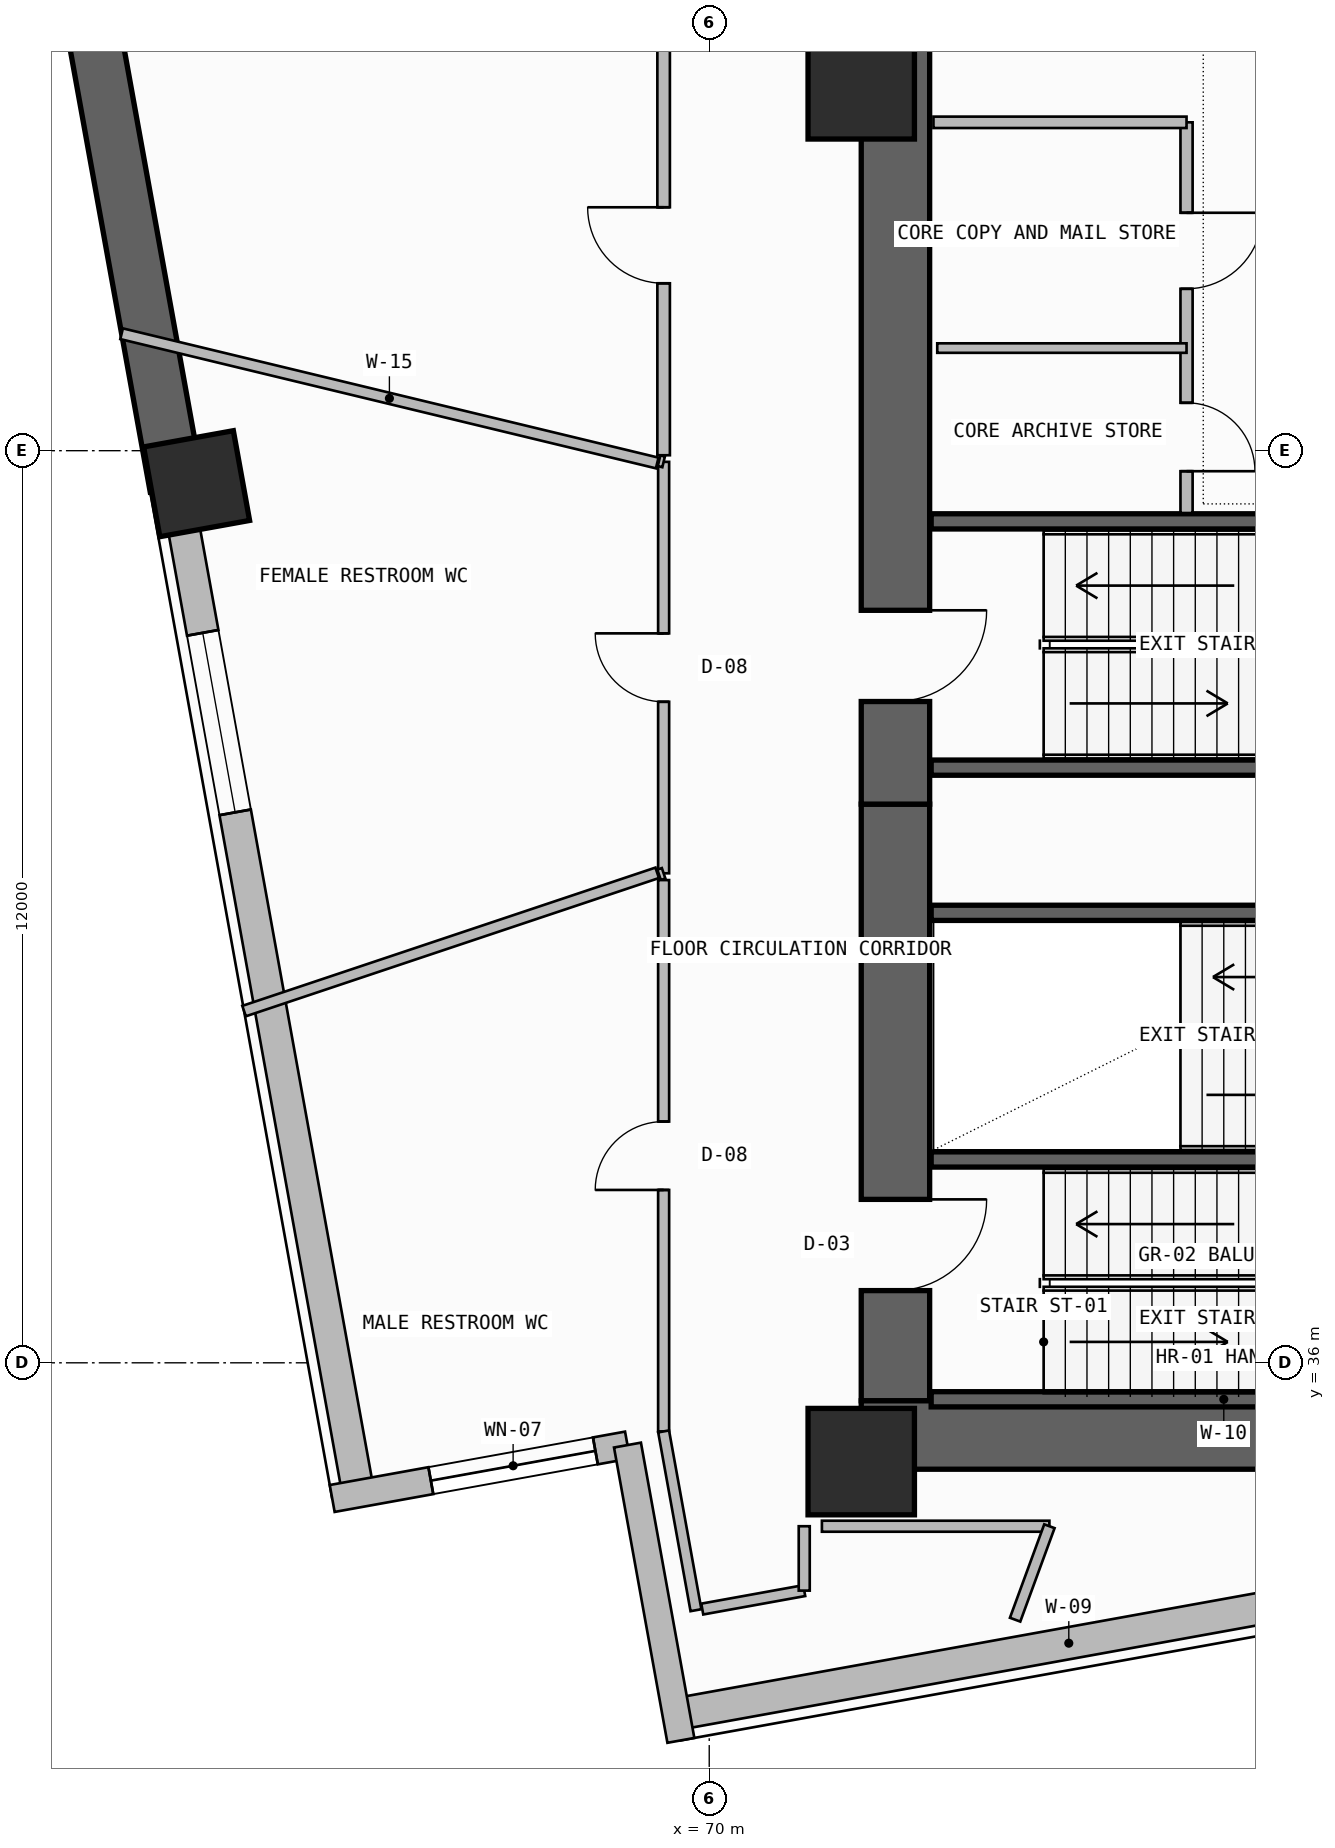
"""IFC4 building model, lengths in metres.
Left out: names, types, materials, properties, quantities, classifications, styles, units other than length and angle.
Written with IfcOpenShell. Run it as: python <this file> out.ifc"""

import sys

from ifc_helpers import new_model, si_unit, direction, frame, frame_2d, origin, origin_2d, place, context, subcontext, project, spatial, rectangle, extrude, element, fill, save


model = new_model("IFC4")
c1 = context("Model", 3, precision=1e-05, world=origin(), true_north=direction((0.0, 1.0)))
c2 = subcontext(c1, "Body", "Model", "MODEL_VIEW")
j1 = project(units=[si_unit("LENGTHUNIT", "METRE"), si_unit("PLANEANGLEUNIT", "RADIAN")], contexts=[c1])
p1 = place(None, origin())
s1 = spatial("IfcSite", under=j1, at=p1, CompositionType="ELEMENT")
p2 = place(p1, origin())
s2 = spatial("IfcBuilding", under=s1, at=p2, CompositionType="ELEMENT")
p3 = place(p2, frame((0.0, 0.0, 99.3)))
s3 = spatial("IfcBuildingStorey", under=s2, at=p3, CompositionType="ELEMENT", Elevation=99.3)
p4 = place(p3, frame((72.45, 35.5, -0.26), z_axis=(0.0, 0.0, 1.0), x_axis=(0.0, 1.0, 0.0)))
e1 = element("IfcWall", 1, at=p4, inside=s3, PredefinedType="SHEAR", context=c2, shape_type="SweptSolid", body=[
    extrude(rectangle(XDim=7.85, YDim=0.9, at=frame_2d((3.925, 0.0))), origin(), (0.0, 0.0, 1.0), 3.6),
])
p5 = place(p4, frame((1.45, 0.0, 0.26)))
e2 = element("IfcOpeningElement", 2, at=p5, cuts=e1, PredefinedType="OPENING", context=c2, shape_type="SweptSolid", body=[
    extrude(rectangle(XDim=1.2, YDim=2.2, at=frame_2d((0.6, 1.1))), frame((0.0, 0.46, 0.0), z_axis=(0.0, -1.0, 0.0), x_axis=(1.0, 0.0, 0.0)), (0.0, 0.0, 1.0), 0.92),
])
p6 = place(p3, frame((72.0, 35.05, -0.26), z_axis=(0.0, 0.0, 1.0), x_axis=(1.0, 0.0, 0.0)))
e3 = element("IfcWall", 3, at=p6, inside=s3, PredefinedType="SHEAR", context=c2, shape_type="SweptSolid", body=[
    extrude(rectangle(XDim=13.9, YDim=0.9, at=frame_2d((6.95, 0.0))), origin(), (0.0, 0.0, 1.0), 3.6),
])
p7 = place(p3, frame((72.45, 43.35, -0.26), z_axis=(0.0, 0.0, 1.0), x_axis=(0.0, 1.0, 0.0)))
e4 = element("IfcWall", 4, at=p7, inside=s3, PredefinedType="SHEAR", context=c2, shape_type="SweptSolid", body=[
    extrude(rectangle(XDim=12.7, YDim=0.9, at=frame_2d((6.35, 0.0))), origin(), (0.0, 0.0, 1.0), 3.6),
])
p8 = place(p7, frame((1.35, 0.0, 0.26)))
e5 = element("IfcOpeningElement", 5, at=p8, cuts=e4, PredefinedType="OPENING", context=c2, shape_type="SweptSolid", body=[
    extrude(rectangle(XDim=1.2, YDim=2.2, at=frame_2d((0.6, 1.1))), frame((0.0, 0.46, 0.0), z_axis=(0.0, -1.0, 0.0), x_axis=(1.0, 0.0, 0.0)), (0.0, 0.0, 1.0), 0.92),
])
for number, where, z_axis, x_axis in (
    (6, (72.0, 34.7, 0.0), (0.0, 0.0, 1.0), (1.0, 0.0, 0.0)),
    (7, (72.0, 52.8, 0.0), (0.0, 0.0, 1.0), (1.0, 0.0, 0.0)),
):
    element("IfcColumn", number, at=place(p3, frame(where, z_axis=z_axis, x_axis=x_axis)), inside=s3, PredefinedType="COLUMN", context=c2, shape_type="SweptSolid", body=[
        extrude(rectangle(XDim=1.4, YDim=1.4, at=origin_2d()), origin(), (0.0, 0.0, 1.0), 3.6),
    ])
p9 = place(p3, frame((63.255, 47.566, 0.0), z_axis=(0.0, 0.0, 1.0), x_axis=(-0.177943545474, 0.984040697646, 0.0)))
e8 = element("IfcColumn", 8, at=p9, inside=s3, PredefinedType="COLUMN", context=c2, shape_type="SweptSolid", body=[
    extrude(rectangle(XDim=1.2, YDim=1.2, at=origin_2d()), origin(), (0.0, 0.0, 1.0), 3.6),
])
p10 = place(p3, frame((69.565, 31.377, 0.0), z_axis=(0.0, 0.0, 1.0), x_axis=(0.98404091451, 0.177942346197, 0.0)))
e9 = element("IfcWall", 9, at=p10, inside=s3, PredefinedType="SOLIDWALL", context=c2, shape_type="SweptSolid", body=[
    extrude(rectangle(XDim=15.583, YDim=0.42, at=frame_2d((7.792, 0.0))), origin(), (0.0, 0.0, 1.0), 3.34),
])
p11 = place(p10, frame((10.5, 0.0, 1.2)))
e10 = element("IfcOpeningElement", 10, at=p11, cuts=e9, PredefinedType="OPENING", context=c2, shape_type="SweptSolid", body=[
    extrude(rectangle(XDim=2.4, YDim=0.9, at=frame_2d((1.2, 0.45))), frame((0.0, 0.22, 0.0), z_axis=(0.0, -1.0, 0.0), x_axis=(1.0, 0.0, 0.0)), (0.0, 0.0, 1.0), 0.44),
])
p12 = place(p3, frame((59.328, 67.768, -0.26), z_axis=(0.0, 0.0, 1.0), x_axis=(0.177933213615, -0.984042565895, 0.0)))
e11 = element("IfcWall", 11, at=p12, inside=s3, PredefinedType="SHEAR", context=c2, shape_type="SweptSolid", body=[
    extrude(rectangle(XDim=20.579, YDim=0.7, at=frame_2d((10.289, 0.0))), origin(), (0.0, 0.0, 1.0), 3.6),
])
p13 = place(p12, frame((9.1, 0.0, 1.2)))
e12 = element("IfcOpeningElement", 12, at=p13, cuts=e11, PredefinedType="OPENING", context=c2, shape_type="SweptSolid", body=[
    extrude(rectangle(XDim=2.4, YDim=0.9, at=frame_2d((1.2, 0.45))), frame((0.0, 0.36, 0.0), z_axis=(0.0, -1.0, 0.0), x_axis=(1.0, 0.0, 0.0)), (0.0, 0.0, 1.0), 0.72),
])
p14 = place(p3, frame((62.99, 47.518, 0.0), z_axis=(0.0, 0.0, 1.0), x_axis=(0.177948058674, -0.984039881516, 0.0)))
e13 = element("IfcWall", 13, at=p14, inside=s3, PredefinedType="SOLIDWALL", context=c2, shape_type="SweptSolid", body=[
    extrude(rectangle(XDim=13.455, YDim=0.42, at=frame_2d((6.728, 0.0))), origin(), (0.0, 0.0, 1.0), 2.725),
])
p15 = place(p14, frame((1.945, 0.0, 1.2)))
e14 = element("IfcOpeningElement", 14, at=p15, cuts=e13, PredefinedType="OPENING", context=c2, shape_type="SweptSolid", body=[
    extrude(rectangle(XDim=2.4, YDim=0.9, at=frame_2d((1.2, 0.45))), frame((0.0, 0.22, 0.0), z_axis=(0.0, -1.0, 0.0), x_axis=(1.0, 0.0, 0.0)), (0.0, 0.0, 1.0), 0.44),
])
p16 = place(p3, frame((65.039, 34.215, 0.0), z_axis=(0.0, 0.0, 1.0), x_axis=(0.984046535247, 0.177911260096, 0.0)))
e15 = element("IfcWall", 15, at=p16, inside=s3, PredefinedType="SOLIDWALL", context=c2, shape_type="SweptSolid", body=[
    extrude(rectangle(XDim=3.948, YDim=0.36, at=frame_2d((1.974, 0.0))), origin(), (0.0, 0.0, 1.0), 3.34),
])
p17 = place(p16, frame((1.319, 0.0, 0.45)))
e16 = element("IfcOpeningElement", 16, at=p17, cuts=e15, PredefinedType="OPENING", context=c2, shape_type="SweptSolid", body=[
    extrude(rectangle(XDim=2.2, YDim=2.4, at=frame_2d((1.1, 1.2))), frame((0.0, 0.19, 0.0), z_axis=(0.0, -1.0, 0.0), x_axis=(1.0, 0.0, 0.0)), (0.0, 0.0, 1.0), 0.38),
])
p18 = place(p3, frame((68.924, 34.917, 0.0), z_axis=(0.0, 0.0, 1.0), x_axis=(0.177981971326, -0.984033748346, 0.0)))
e17 = element("IfcWall", 17, at=p18, inside=s3, PredefinedType="SOLIDWALL", context=c2, shape_type="SweptSolid", body=[
    extrude(rectangle(XDim=3.948, YDim=0.36, at=frame_2d((1.974, 0.0))), origin(), (0.0, 0.0, 1.0), 3.34),
])
for number, where, z_axis, x_axis in (
    (18, (72.92, 35.52, -0.26), (0.0, 0.0, 1.0), (1.0, 0.0, 0.0)),
    (19, (72.92, 38.675, -0.26), (0.0, 0.0, 1.0), (1.0, 0.0, 0.0)),
):
    element("IfcWall", number, at=place(p3, frame(where, z_axis=z_axis, x_axis=x_axis)), inside=s3, PredefinedType="SOLIDWALL", context=c2, shape_type="SweptSolid", body=[
        extrude(rectangle(XDim=7.7, YDim=0.2, at=frame_2d((3.85, 0.0))), origin(), (0.0, 0.0, 1.0), 3.6),
    ])
p19 = place(p3, frame((72.92, 41.92, -0.26), z_axis=(0.0, 0.0, 1.0), x_axis=(1.0, 0.0, 0.0)))
e20 = element("IfcWall", 20, at=p19, inside=s3, PredefinedType="SOLIDWALL", context=c2, shape_type="SweptSolid", body=[
    extrude(rectangle(XDim=7.58, YDim=0.2, at=frame_2d((3.79, 0.0))), origin(), (0.0, 0.0, 1.0), 3.6),
])
for number, where, z_axis, x_axis in (
    (21, (72.92, 43.83, -0.26), (0.0, 0.0, 1.0), (1.0, 0.0, 0.0)),
    (22, (72.92, 47.07, -0.26), (0.0, 0.0, 1.0), (1.0, 0.0, 0.0)),
):
    element("IfcWall", number, at=place(p3, frame(where, z_axis=z_axis, x_axis=x_axis)), inside=s3, PredefinedType="SOLIDWALL", context=c2, shape_type="SweptSolid", body=[
        extrude(rectangle(XDim=7.7, YDim=0.2, at=frame_2d((3.85, 0.0))), origin(), (0.0, 0.0, 1.0), 3.6),
    ])
p20 = place(p3, frame((76.28, 47.18, 0.0), z_axis=(0.0, 0.0, 1.0), x_axis=(0.0, 1.0, 0.0)))
e23 = element("IfcWall", 23, at=p20, inside=s3, PredefinedType="SOLIDWALL", context=c2, shape_type="SweptSolid", body=[
    extrude(rectangle(XDim=5.14, YDim=0.16, at=frame_2d((2.57, 0.0))), origin(), (0.0, 0.0, 1.0), 3.34),
])
p21 = place(p20, frame((0.55, 0.0, 0.0)))
e24 = element("IfcOpeningElement", 24, at=p21, cuts=e23, PredefinedType="OPENING", context=c2, shape_type="SweptSolid", body=[
    extrude(rectangle(XDim=0.9, YDim=2.1, at=frame_2d((0.45, 1.05))), frame((0.0, 0.09, 0.0), z_axis=(0.0, -1.0, 0.0), x_axis=(1.0, 0.0, 0.0)), (0.0, 0.0, 1.0), 0.18),
])
p22 = place(p20, frame((2.95, 0.0, 0.0)))
e25 = element("IfcOpeningElement", 25, at=p22, cuts=e23, PredefinedType="OPENING", context=c2, shape_type="SweptSolid", body=[
    extrude(rectangle(XDim=1.0, YDim=2.2, at=frame_2d((0.5, 1.1))), frame((0.0, 0.09, 0.0), z_axis=(0.0, -1.0, 0.0), x_axis=(1.0, 0.0, 0.0)), (0.0, 0.0, 1.0), 0.18),
])
p23 = place(p3, frame((72.95, 52.32, 0.0), z_axis=(0.0, 0.0, 1.0), x_axis=(1.0, 0.0, 0.0)))
e26 = element("IfcWall", 26, at=p23, inside=s3, PredefinedType="SOLIDWALL", context=c2, shape_type="SweptSolid", body=[
    extrude(rectangle(XDim=3.33, YDim=0.15, at=frame_2d((1.665, 0.0))), origin(), (0.0, 0.0, 1.0), 3.34),
])
p24 = place(p3, frame((73.0, 49.35, 0.0), z_axis=(0.0, 0.0, 1.0), x_axis=(1.0, 0.0, 0.0)))
e27 = element("IfcWall", 27, at=p24, inside=s3, PredefinedType="PARTITIONING", context=c2, shape_type="SweptSolid", body=[
    extrude(rectangle(XDim=3.28, YDim=0.125, at=frame_2d((1.64, 0.0))), origin(), (0.0, 0.0, 1.0), 3.34),
])
p25 = place(p3, frame((69.4, 47.853, 0.0), z_axis=(0.0, 0.0, 1.0), x_axis=(0.0, -1.0, 0.0)))
e28 = element("IfcWall", 28, at=p25, inside=s3, PredefinedType="PARTITIONING", context=c2, shape_type="SweptSolid", body=[
    extrude(rectangle(XDim=5.413, YDim=0.145, at=frame_2d((2.707, 0.0))), origin(), (0.0, 0.0, 1.0), 3.34),
])
p26 = place(p25, frame((2.257, 0.0, 0.0)))
e29 = element("IfcOpeningElement", 29, at=p26, cuts=e28, PredefinedType="OPENING", context=c2, shape_type="SweptSolid", body=[
    extrude(rectangle(XDim=0.9, YDim=2.1, at=frame_2d((0.45, 1.05))), frame((0.0, 0.083, 0.0), z_axis=(0.0, -1.0, 0.0), x_axis=(1.0, 0.0, 0.0)), (0.0, 0.0, 1.0), 0.165),
])
p27 = place(p3, frame((69.4, 42.44, 0.0), z_axis=(0.0, 0.0, 1.0), x_axis=(-0.947125628306, -0.320862967957, 0.0)))
e30 = element("IfcWall", 30, at=p27, inside=s3, PredefinedType="PARTITIONING", context=c2, shape_type="SweptSolid", body=[
    extrude(rectangle(XDim=0.063, YDim=0.145, at=frame_2d((0.032, 0.0))), origin(), (0.0, 0.0, 1.0), 3.34),
])
p28 = place(p3, frame((69.34, 47.867, 0.0), z_axis=(0.0, 0.0, 1.0), x_axis=(0.972206912962, -0.234123297407, 0.0)))
e31 = element("IfcWall", 31, at=p28, inside=s3, PredefinedType="PARTITIONING", context=c2, shape_type="SweptSolid", body=[
    extrude(rectangle(XDim=0.062, YDim=0.145, at=frame_2d((0.031, 0.0))), origin(), (0.0, 0.0, 1.0), 3.34),
])
p29 = place(p3, frame((69.315, 42.446, 0.0), z_axis=(0.0, 0.0, 1.0), x_axis=(-0.948316351799, -0.317326483152, 0.0)))
e32 = element("IfcWall", 32, at=p29, inside=s3, PredefinedType="PARTITIONING", context=c2, shape_type="SweptSolid", body=[
    extrude(rectangle(XDim=5.732, YDim=0.145, at=frame_2d((2.866, 0.0))), origin(), (0.0, 0.0, 1.0), 3.34),
])
p30 = place(p3, frame((62.269, 49.539, 0.0), z_axis=(0.0, 0.0, 1.0), x_axis=(0.972098894047, -0.234571396793, 0.0)))
e33 = element("IfcWall", 33, at=p30, inside=s3, PredefinedType="PARTITIONING", context=c2, shape_type="SweptSolid", body=[
    extrude(rectangle(XDim=7.249, YDim=0.145, at=frame_2d((3.625, 0.0))), origin(), (0.0, 0.0, 1.0), 2.725),
])
p31 = place(p3, frame((69.4, 42.351, 0.0), z_axis=(0.0, 0.0, 1.0), x_axis=(0.0, -1.0, 0.0)))
e34 = element("IfcWall", 34, at=p31, inside=s3, PredefinedType="PARTITIONING", context=c2, shape_type="SweptSolid", body=[
    extrude(rectangle(XDim=7.253, YDim=0.145, at=frame_2d((3.627, 0.0))), origin(), (0.0, 0.0, 1.0), 3.34),
])
p32 = place(p31, frame((3.177, 0.0, 0.0)))
e35 = element("IfcOpeningElement", 35, at=p32, cuts=e34, PredefinedType="OPENING", context=c2, shape_type="SweptSolid", body=[
    extrude(rectangle(XDim=0.9, YDim=2.1, at=frame_2d((0.45, 1.05))), frame((0.0, 0.083, 0.0), z_axis=(0.0, -1.0, 0.0), x_axis=(1.0, 0.0, 0.0)), (0.0, 0.0, 1.0), 0.165),
])
p33 = place(p3, frame((69.4, 35.097, 0.0), z_axis=(0.0, 0.0, 1.0), x_axis=(0.177914684573, -0.98404591611, 0.0)))
e36 = element("IfcWall", 36, at=p33, inside=s3, PredefinedType="PARTITIONING", context=c2, shape_type="SweptSolid", body=[
    extrude(rectangle(XDim=2.39, YDim=0.145, at=frame_2d((1.195, 0.0))), origin(), (0.0, 0.0, 1.0), 3.34),
])
p34 = place(p3, frame((69.908, 32.76, 0.0), z_axis=(0.0, 0.0, 1.0), x_axis=(0.984029967613, 0.178002873122, 0.0)))
e37 = element("IfcWall", 37, at=p34, inside=s3, PredefinedType="PARTITIONING", context=c2, shape_type="SweptSolid", body=[
    extrude(rectangle(XDim=1.363, YDim=0.145, at=frame_2d((0.682, 0.0))), origin(), (0.0, 0.0, 1.0), 3.34),
])
p35 = place(p3, frame((71.25, 33.003, 0.0), z_axis=(0.0, 0.0, 1.0), x_axis=(0.0, 1.0, 0.0)))
e38 = element("IfcWall", 38, at=p35, inside=s3, PredefinedType="PARTITIONING", context=c2, shape_type="SweptSolid", body=[
    extrude(rectangle(XDim=0.847, YDim=0.145, at=frame_2d((0.424, 0.0))), origin(), (0.0, 0.0, 1.0), 3.34),
])
p36 = place(p3, frame((69.4, 55.232, 0.0), z_axis=(0.0, 0.0, 1.0), x_axis=(0.0, -1.0, 0.0)))
e39 = element("IfcWall", 39, at=p36, inside=s3, PredefinedType="PARTITIONING", context=c2, shape_type="SweptSolid", body=[
    extrude(rectangle(XDim=7.292, YDim=0.165, at=frame_2d((3.646, 0.0))), origin(), (0.0, 0.0, 1.0), 2.725),
])
p37 = place(p36, frame((4.03, 0.0, 0.0)))
e40 = element("IfcOpeningElement", 40, at=p37, cuts=e39, PredefinedType="OPENING", context=c2, shape_type="SweptSolid", body=[
    extrude(rectangle(XDim=1.0, YDim=2.2, at=frame_2d((0.5, 1.1))), frame((0.0, 0.093, 0.0), z_axis=(0.0, -1.0, 0.0), x_axis=(1.0, 0.0, 0.0)), (0.0, 0.0, 1.0), 0.185),
])
p38 = place(p3, frame((71.482, 33.85, 0.0), z_axis=(0.0, 0.0, 1.0), x_axis=(1.0, 0.0, 0.0)))
e41 = element("IfcWall", 41, at=p38, inside=s3, PredefinedType="PARTITIONING", context=c2, shape_type="SweptSolid", body=[
    extrude(rectangle(XDim=2.993, YDim=0.145, at=frame_2d((1.497, 0.0))), origin(), (0.0, 0.0, 1.0), 3.34),
])
p39 = place(p3, frame((74.476, 33.85, 0.0), z_axis=(0.0, 0.0, 1.0), x_axis=(-0.344495644984, -0.938787915659, 0.0)))
e42 = element("IfcWall", 42, at=p39, inside=s3, PredefinedType="PARTITIONING", context=c2, shape_type="SweptSolid", body=[
    extrude(rectangle(XDim=1.31, YDim=0.145, at=frame_2d((0.655, 0.0))), origin(), (0.0, 0.0, 1.0), 3.34),
])
p40 = place(p15, origin())
e43 = element("IfcWindow", 43, at=p40, inside=s3, PartitioningType="SINGLE_PANEL", PredefinedType="WINDOW", context=c2, shape_type="SweptSolid", body=[
    extrude(rectangle(XDim=2.4, YDim=0.9, at=frame_2d((1.2, 0.45))), frame((0.0, 0.03, 0.0), z_axis=(0.0, -1.0, 0.0), x_axis=(1.0, 0.0, 0.0)), (0.0, 0.0, 1.0), 0.06),
])
fill(e14, e43)
p41 = place(p17, origin())
e44 = element("IfcWindow", 44, at=p41, inside=s3, PartitioningType="SINGLE_PANEL", PredefinedType="WINDOW", context=c2, shape_type="SweptSolid", body=[
    extrude(rectangle(XDim=2.2, YDim=2.4, at=frame_2d((1.1, 1.2))), frame((0.0, 0.03, 0.0), z_axis=(0.0, -1.0, 0.0), x_axis=(1.0, 0.0, 0.0)), (0.0, 0.0, 1.0), 0.06),
])
fill(e16, e44)
p42 = place(p5, frame((1.2, 0.0, 0.0), z_axis=(0.0, 0.0, 1.0), x_axis=(-1.0, 0.0, 0.0)))
e45 = element("IfcDoor", 45, at=p42, inside=s3, OperationType="SINGLE_SWING_LEFT", PredefinedType="USERDEFINED", context=c2, shape_type="SweptSolid", body=[
    extrude(rectangle(XDim=1.2, YDim=2.2, at=frame_2d((0.6, 1.1))), frame((0.0, 0.025, 0.0), z_axis=(0.0, -1.0, 0.0), x_axis=(1.0, 0.0, 0.0)), (0.0, 0.0, 1.0), 0.05),
])
fill(e2, e45)
p43 = place(p8, frame((1.2, 0.0, 0.0), z_axis=(0.0, 0.0, 1.0), x_axis=(-1.0, 0.0, 0.0)))
e46 = element("IfcDoor", 46, at=p43, inside=s3, OperationType="SINGLE_SWING_LEFT", PredefinedType="USERDEFINED", context=c2, shape_type="SweptSolid", body=[
    extrude(rectangle(XDim=1.2, YDim=2.2, at=frame_2d((0.6, 1.1))), frame((0.0, 0.025, 0.0), z_axis=(0.0, -1.0, 0.0), x_axis=(1.0, 0.0, 0.0)), (0.0, 0.0, 1.0), 0.05),
])
fill(e5, e46)
p44 = place(p21, frame((0.9, 0.0, 0.0), z_axis=(0.0, 0.0, 1.0), x_axis=(-1.0, 0.0, 0.0)))
e47 = element("IfcDoor", 47, at=p44, inside=s3, OperationType="SINGLE_SWING_RIGHT", PredefinedType="DOOR", context=c2, shape_type="SweptSolid", body=[
    extrude(rectangle(XDim=0.9, YDim=2.1, at=frame_2d((0.45, 1.05))), frame((0.0, 0.025, 0.0), z_axis=(0.0, -1.0, 0.0), x_axis=(1.0, 0.0, 0.0)), (0.0, 0.0, 1.0), 0.05),
])
fill(e24, e47)
p45 = place(p22, frame((1.0, 0.0, 0.0), z_axis=(0.0, 0.0, 1.0), x_axis=(-1.0, 0.0, 0.0)))
e48 = element("IfcDoor", 48, at=p45, inside=s3, OperationType="SINGLE_SWING_LEFT", PredefinedType="DOOR", context=c2, shape_type="SweptSolid", body=[
    extrude(rectangle(XDim=1.0, YDim=2.2, at=frame_2d((0.5, 1.1))), frame((0.0, 0.025, 0.0), z_axis=(0.0, -1.0, 0.0), x_axis=(1.0, 0.0, 0.0)), (0.0, 0.0, 1.0), 0.05),
])
fill(e25, e48)
p46 = place(p26, frame((0.9, 0.0, 0.0), z_axis=(0.0, 0.0, 1.0), x_axis=(-1.0, 0.0, 0.0)))
e49 = element("IfcDoor", 49, at=p46, inside=s3, OperationType="SINGLE_SWING_RIGHT", PredefinedType="DOOR", context=c2, shape_type="SweptSolid", body=[
    extrude(rectangle(XDim=0.9, YDim=2.1, at=frame_2d((0.45, 1.05))), frame((0.0, 0.025, 0.0), z_axis=(0.0, -1.0, 0.0), x_axis=(1.0, 0.0, 0.0)), (0.0, 0.0, 1.0), 0.05),
])
fill(e29, e49)
p47 = place(p32, frame((0.9, 0.0, 0.0), z_axis=(0.0, 0.0, 1.0), x_axis=(-1.0, 0.0, 0.0)))
e50 = element("IfcDoor", 50, at=p47, inside=s3, OperationType="SINGLE_SWING_LEFT", PredefinedType="DOOR", context=c2, shape_type="SweptSolid", body=[
    extrude(rectangle(XDim=0.9, YDim=2.1, at=frame_2d((0.45, 1.05))), frame((0.0, 0.025, 0.0), z_axis=(0.0, -1.0, 0.0), x_axis=(1.0, 0.0, 0.0)), (0.0, 0.0, 1.0), 0.05),
])
fill(e35, e50)
p48 = place(p37, frame((1.0, 0.0, 0.0), z_axis=(0.0, 0.0, 1.0), x_axis=(-1.0, 0.0, 0.0)))
e51 = element("IfcDoor", 51, at=p48, inside=s3, OperationType="SINGLE_SWING_RIGHT", PredefinedType="DOOR", context=c2, shape_type="SweptSolid", body=[
    extrude(rectangle(XDim=1.0, YDim=2.2, at=frame_2d((0.5, 1.1))), frame((0.0, 0.025, 0.0), z_axis=(0.0, -1.0, 0.0), x_axis=(1.0, 0.0, 0.0)), (0.0, 0.0, 1.0), 0.05),
])
fill(e40, e51)
save(model, sys.argv[1])
